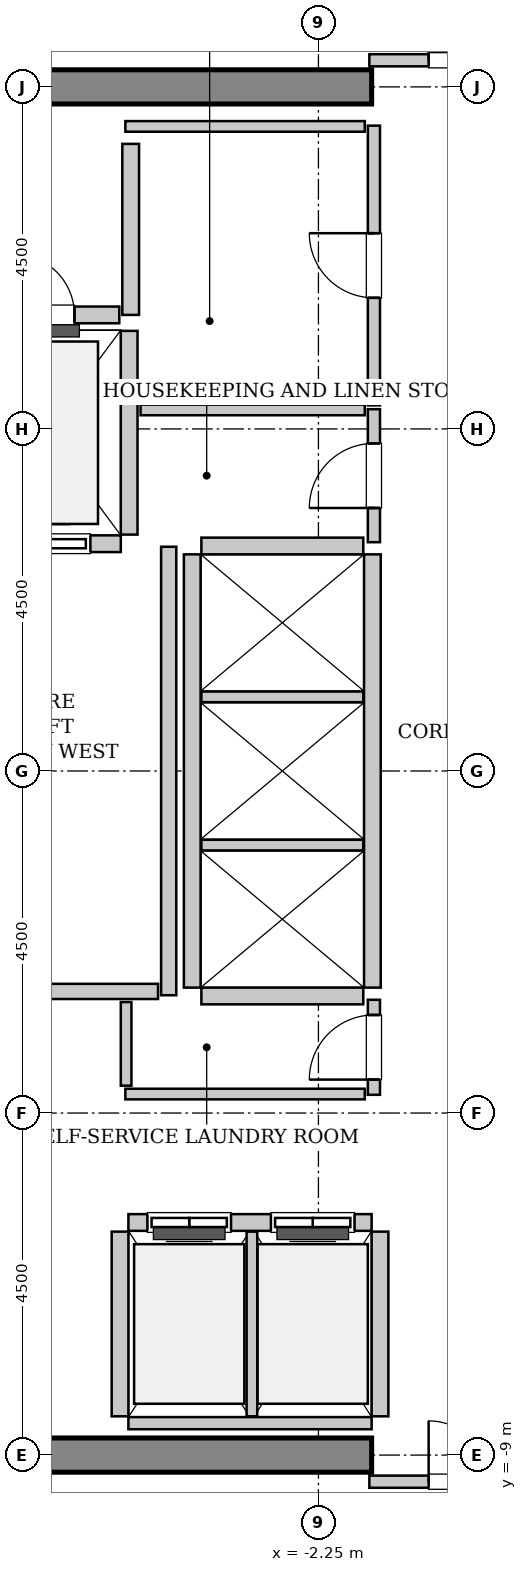
"""IFC4 building model, lengths in metres.
Left out: names, types, materials, properties, quantities, classifications, styles, units other than length and angle.
Written with IfcOpenShell. Run it as: python <this file> out.ifc"""

import sys

from ifc_helpers import new_model, si_unit, direction, frame, frame_2d, origin, place, context, subcontext, project, spatial, rectangle, extrude, source, transform, mapped, element, fill, save


model = new_model("IFC4")
c1 = context("Model", 3, precision=1e-05, world=origin(), true_north=direction((0.0, 1.0)))
c2 = subcontext(c1, "Body", "Model", "MODEL_VIEW")
j1 = project(units=[si_unit("LENGTHUNIT", "METRE"), si_unit("PLANEANGLEUNIT", "RADIAN")], contexts=[c1])
p1 = place(None, origin())
s1 = spatial("IfcSite", under=j1, at=p1, CompositionType="ELEMENT")
p2 = place(p1, origin())
s2 = spatial("IfcBuilding", under=s1, at=p2, CompositionType="ELEMENT")
p3 = place(p2, frame((0.0, 0.0, 206.6)))
s3 = spatial("IfcBuildingStorey", under=s2, at=p3, CompositionType="ELEMENT", Elevation=206.6)
m1 = source(origin(), c2, "Body", "SweptSolid", [
    extrude(rectangle(XDim=9.925, YDim=0.45, at=frame_2d((4.962, 0.0))), origin(), (0.0, 0.0, 1.0), 3.8),
])
for number, where, z_axis, x_axis in (
    (1, (-11.475, 9.0, 0.0), (0.0, 0.0, 1.0), (1.0, 0.0, 0.0)),
    (2, (-11.475, -9.0, 0.0), (0.0, 0.0, 1.0), (1.0, 0.0, 0.0)),
):
    element("IfcWall", number, at=place(p3, frame(where, z_axis=z_axis, x_axis=x_axis)), inside=s3, PredefinedType="SHEAR", context=c2, shape_type="MappedRepresentation", body=[
        mapped(m1, transform((0.0, 0.0, 0.0), x_axis=(1.0, 0.0, 0.0), y_axis=(0.0, 1.0, 0.0), z_axis=(0.0, 0.0, 1.0), scale=1.0)),
    ])
m2 = source(origin(), c2, "Body", "SweptSolid", [
    extrude(rectangle(XDim=2.0, YDim=0.22, at=frame_2d((1.0, 0.0))), origin(), (0.0, 0.0, 1.0), 3.535),
])
p4 = place(p3, frame((-6.85, 2.99, 0.0), z_axis=(0.0, 0.0, 1.0), x_axis=(1.0, 0.0, 0.0)))
e3 = element("IfcWall", 3, at=p4, inside=s3, PredefinedType="SOLIDWALL", context=c2, shape_type="MappedRepresentation", body=[
    mapped(m2, transform((0.0, 0.0, 0.0), x_axis=(1.0, 0.0, 0.0), y_axis=(0.0, 1.0, 0.0), z_axis=(0.0, 0.0, 1.0), scale=1.0)),
])
p5 = place(p4, frame((0.4, 0.0, 0.0)))
e4 = element("IfcOpeningElement", 4, at=p5, cuts=e3, PredefinedType="OPENING", context=c2, shape_type="SweptSolid", body=[
    extrude(rectangle(XDim=1.2, YDim=2.2, at=frame_2d((0.6, 1.1))), frame((0.0, 0.12, 0.0), z_axis=(0.0, -1.0, 0.0), x_axis=(1.0, 0.0, 0.0)), (0.0, 0.0, 1.0), 0.24),
])
m3 = source(origin(), c2, "Body", "SweptSolid", [
    extrude(rectangle(XDim=2.68, YDim=0.22, at=frame_2d((1.34, 0.0))), origin(), (0.0, 0.0, 1.0), 3.535),
])
p6 = place(p3, frame((-4.74, 3.11, 0.0), z_axis=(0.0, 0.0, 1.0), x_axis=(0.0, 1.0, 0.0)))
e5 = element("IfcWall", 5, at=p6, inside=s3, PredefinedType="SOLIDWALL", context=c2, shape_type="MappedRepresentation", body=[
    mapped(m3, transform((0.0, 0.0, 0.0), x_axis=(1.0, 0.0, 0.0), y_axis=(0.0, 1.0, 0.0), z_axis=(0.0, 0.0, 1.0), scale=1.0)),
])
m4 = source(origin(), c2, "Body", "SweptSolid", [
    extrude(rectangle(XDim=3.2, YDim=0.22, at=frame_2d((1.6, 0.0))), origin(), (0.0, 0.0, 1.0), 3.535),
])
p7 = place(p3, frame((-1.55, -5.94, 0.0), z_axis=(0.0, 0.0, 1.0), x_axis=(-1.0, 0.0, 0.0)))
e6 = element("IfcWall", 6, at=p7, inside=s3, PredefinedType="SOLIDWALL", context=c2, shape_type="MappedRepresentation", body=[
    mapped(m4, transform((0.0, 0.0, 0.0), x_axis=(1.0, 0.0, 0.0), y_axis=(0.0, 1.0, 0.0), z_axis=(0.0, 0.0, 1.0), scale=1.0)),
])
p8 = place(p7, frame((1.85, 0.0, 0.0)))
e7 = element("IfcOpeningElement", 7, at=p8, cuts=e6, PredefinedType="OPENING", context=c2, shape_type="SweptSolid", body=[
    extrude(rectangle(XDim=1.1, YDim=2.2, at=frame_2d((0.55, 1.1))), frame((0.0, 0.12, 0.0), z_axis=(0.0, -1.0, 0.0), x_axis=(1.0, 0.0, 0.0)), (0.0, 0.0, 1.0), 0.24),
])
p9 = place(p7, frame((0.225, 0.0, 0.0)))
e8 = element("IfcOpeningElement", 8, at=p9, cuts=e6, PredefinedType="OPENING", context=c2, shape_type="SweptSolid", body=[
    extrude(rectangle(XDim=1.1, YDim=2.2, at=frame_2d((0.55, 1.1))), frame((0.0, 0.12, 0.0), z_axis=(0.0, -1.0, 0.0), x_axis=(1.0, 0.0, 0.0)), (0.0, 0.0, 1.0), 0.24),
])
m5 = source(origin(), c2, "Body", "SweptSolid", [
    extrude(rectangle(XDim=3.2, YDim=0.16, at=frame_2d((1.6, 0.0))), origin(), (0.0, 0.0, 1.0), 2.625),
])
p10 = place(p3, frame((-4.75, -8.58, 0.0), z_axis=(0.0, 0.0, 1.0), x_axis=(1.0, 0.0, 0.0)))
e9 = element("IfcWall", 9, at=p10, inside=s3, PredefinedType="PARTITIONING", context=c2, shape_type="MappedRepresentation", body=[
    mapped(m5, transform((0.0, 0.0, 0.0), x_axis=(1.0, 0.0, 0.0), y_axis=(0.0, 1.0, 0.0), z_axis=(0.0, 0.0, 1.0), scale=1.0)),
])
m6 = source(origin(), c2, "Body", "SweptSolid", [
    extrude(rectangle(XDim=2.43, YDim=0.22, at=frame_2d((1.215, 0.0))), origin(), (0.0, 0.0, 1.0), 3.535),
])
p11 = place(p3, frame((-4.86, -6.06, 0.0), z_axis=(0.0, 0.0, 1.0), x_axis=(0.0, -1.0, 0.0)))
e10 = element("IfcWall", 10, at=p11, inside=s3, PredefinedType="SOLIDWALL", context=c2, shape_type="MappedRepresentation", body=[
    mapped(m6, transform((0.0, 0.0, 0.0), x_axis=(1.0, 0.0, 0.0), y_axis=(0.0, 1.0, 0.0), z_axis=(0.0, 0.0, 1.0), scale=1.0)),
])
m7 = source(origin(), c2, "Body", "SweptSolid", [
    extrude(rectangle(XDim=2.43, YDim=0.14, at=frame_2d((1.215, 0.0))), origin(), (0.0, 0.0, 1.0), 3.535),
])
p12 = place(p3, frame((-3.125, -8.49, 0.0), z_axis=(0.0, 0.0, 1.0), x_axis=(0.0, 1.0, 0.0)))
e11 = element("IfcWall", 11, at=p12, inside=s3, PredefinedType="PARTITIONING", context=c2, shape_type="MappedRepresentation", body=[
    mapped(m7, transform((0.0, 0.0, 0.0), x_axis=(1.0, 0.0, 0.0), y_axis=(0.0, 1.0, 0.0), z_axis=(0.0, 0.0, 1.0), scale=1.0)),
])
p13 = place(p3, frame((-1.44, -8.49, 0.0), z_axis=(0.0, 0.0, 1.0), x_axis=(0.0, 1.0, 0.0)))
e12 = element("IfcWall", 12, at=p13, inside=s3, PredefinedType="SOLIDWALL", context=c2, shape_type="MappedRepresentation", body=[
    mapped(m6, transform((0.0, 0.0, 0.0), x_axis=(1.0, 0.0, 0.0), y_axis=(0.0, 1.0, 0.0), z_axis=(0.0, 0.0, 1.0), scale=1.0)),
])
m8 = source(origin(), c2, "Body", "SweptSolid", [
    extrude(rectangle(XDim=5.7, YDim=0.22, at=frame_2d((2.85, 0.0))), origin(), (0.0, 0.0, 1.0), 3.535),
])
for number, where, z_axis, x_axis in (
    (13, (-1.54, -2.85, 0.0), (0.0, 0.0, 1.0), (0.0, 1.0, 0.0)),
    (14, (-3.91, 2.85, 0.0), (0.0, 0.0, 1.0), (0.0, -1.0, 0.0)),
):
    element("IfcWall", number, at=place(p3, frame(where, z_axis=z_axis, x_axis=x_axis)), inside=s3, PredefinedType="SOLIDWALL", context=c2, shape_type="MappedRepresentation", body=[
        mapped(m8, transform((0.0, 0.0, 0.0), x_axis=(1.0, 0.0, 0.0), y_axis=(0.0, 1.0, 0.0), z_axis=(0.0, 0.0, 1.0), scale=1.0)),
    ])
m9 = source(origin(), c2, "Body", "SweptSolid", [
    extrude(rectangle(XDim=2.13, YDim=0.22, at=frame_2d((1.065, 0.0))), origin(), (0.0, 0.0, 1.0), 3.535),
])
p14 = place(p3, frame((-3.79, -2.96, 0.0), z_axis=(0.0, 0.0, 1.0), x_axis=(1.0, 0.0, 0.0)))
e15 = element("IfcWall", 15, at=p14, inside=s3, PredefinedType="SOLIDWALL", context=c2, shape_type="MappedRepresentation", body=[
    mapped(m9, transform((0.0, 0.0, 0.0), x_axis=(1.0, 0.0, 0.0), y_axis=(0.0, 1.0, 0.0), z_axis=(0.0, 0.0, 1.0), scale=1.0)),
])
m10 = source(origin(), c2, "Body", "SweptSolid", [
    extrude(rectangle(XDim=2.13, YDim=0.14, at=frame_2d((1.065, 0.0))), origin(), (0.0, 0.0, 1.0), 3.535),
])
for number, where, z_axis, x_axis in (
    (16, (-3.79, -0.975, 0.0), (0.0, 0.0, 1.0), (1.0, 0.0, 0.0)),
    (17, (-3.79, 0.975, 0.0), (0.0, 0.0, 1.0), (1.0, 0.0, 0.0)),
):
    element("IfcWall", number, at=place(p3, frame(where, z_axis=z_axis, x_axis=x_axis)), inside=s3, PredefinedType="PARTITIONING", context=c2, shape_type="MappedRepresentation", body=[
        mapped(m10, transform((0.0, 0.0, 0.0), x_axis=(1.0, 0.0, 0.0), y_axis=(0.0, 1.0, 0.0), z_axis=(0.0, 0.0, 1.0), scale=1.0)),
    ])
p15 = place(p3, frame((-1.66, 2.96, 0.0), z_axis=(0.0, 0.0, 1.0), x_axis=(-1.0, 0.0, 0.0)))
e18 = element("IfcWall", 18, at=p15, inside=s3, PredefinedType="SOLIDWALL", context=c2, shape_type="MappedRepresentation", body=[
    mapped(m9, transform((0.0, 0.0, 0.0), x_axis=(1.0, 0.0, 0.0), y_axis=(0.0, 1.0, 0.0), z_axis=(0.0, 0.0, 1.0), scale=1.0)),
])
m11 = source(origin(), c2, "Body", "SweptSolid", [
    extrude(rectangle(XDim=2.25, YDim=0.22, at=frame_2d((1.125, 0.0))), origin(), (0.0, 0.0, 1.0), 3.535),
])
p16 = place(p3, frame((-4.72, 6.0, 0.0), z_axis=(0.0, 0.0, 1.0), x_axis=(0.0, 1.0, 0.0)))
e19 = element("IfcWall", 19, at=p16, inside=s3, PredefinedType="SOLIDWALL", context=c2, shape_type="MappedRepresentation", body=[
    mapped(m11, transform((0.0, 0.0, 0.0), x_axis=(1.0, 0.0, 0.0), y_axis=(0.0, 1.0, 0.0), z_axis=(0.0, 0.0, 1.0), scale=1.0)),
])
m12 = source(origin(), c2, "Body", "SweptSolid", [
    extrude(rectangle(XDim=1.98, YDim=0.22, at=frame_2d((0.99, 0.0))), origin(), (0.0, 0.0, 1.0), 3.535),
])
p17 = place(p3, frame((-6.85, 6.0, 0.0), z_axis=(0.0, 0.0, 1.0), x_axis=(1.0, 0.0, 0.0)))
e20 = element("IfcWall", 20, at=p17, inside=s3, PredefinedType="SOLIDWALL", context=c2, shape_type="MappedRepresentation", body=[
    mapped(m12, transform((0.0, 0.0, 0.0), x_axis=(1.0, 0.0, 0.0), y_axis=(0.0, 1.0, 0.0), z_axis=(0.0, 0.0, 1.0), scale=1.0)),
])
p18 = place(p17, frame((0.59, 0.0, 0.0)))
e21 = element("IfcOpeningElement", 21, at=p18, cuts=e20, PredefinedType="OPENING", context=c2, shape_type="SweptSolid", body=[
    extrude(rectangle(XDim=0.8, YDim=2.0, at=frame_2d((0.4, 1.0))), frame((0.0, 0.12, 0.0), z_axis=(0.0, -1.0, 0.0), x_axis=(1.0, 0.0, 0.0)), (0.0, 0.0, 1.0), 0.24),
])
m13 = source(origin(), c2, "Body", "SweptSolid", [
    extrude(rectangle(XDim=5.9, YDim=0.2, at=frame_2d((2.95, 0.0))), origin(), (0.0, 0.0, 1.0), 3.535),
])
p19 = place(p3, frame((-4.22, -2.95, 0.0), z_axis=(0.0, 0.0, 1.0), x_axis=(0.0, 1.0, 0.0)))
e22 = element("IfcWall", 22, at=p19, inside=s3, PredefinedType="PARTITIONING", context=c2, shape_type="MappedRepresentation", body=[
    mapped(m13, transform((0.0, 0.0, 0.0), x_axis=(1.0, 0.0, 0.0), y_axis=(0.0, 1.0, 0.0), z_axis=(0.0, 0.0, 1.0), scale=1.0)),
])
m14 = source(origin(), c2, "Body", "SweptSolid", [
    extrude(rectangle(XDim=2.9, YDim=0.2, at=frame_2d((1.45, 0.0))), origin(), (0.0, 0.0, 1.0), 3.535),
])
p20 = place(p3, frame((-7.26, -2.9, 0.0), z_axis=(0.0, 0.0, 1.0), x_axis=(1.0, 0.0, 0.0)))
e23 = element("IfcWall", 23, at=p20, inside=s3, PredefinedType="PARTITIONING", context=c2, shape_type="MappedRepresentation", body=[
    mapped(m14, transform((0.0, 0.0, 0.0), x_axis=(1.0, 0.0, 0.0), y_axis=(0.0, 1.0, 0.0), z_axis=(0.0, 0.0, 1.0), scale=1.0)),
])
m15 = source(origin(), c2, "Body", "SweptSolid", [
    extrude(rectangle(XDim=3.16, YDim=0.16, at=frame_2d((1.58, 0.0))), origin(), (0.0, 0.0, 1.0), 2.625),
])
p21 = place(p3, frame((-1.58, 9.35, 0.0), z_axis=(0.0, 0.0, 1.0), x_axis=(1.0, 0.0, 0.0)))
e24 = element("IfcWall", 24, at=p21, inside=s3, PredefinedType="PARTITIONING", context=c2, shape_type="MappedRepresentation", body=[
    mapped(m15, transform((0.0, 0.0, 0.0), x_axis=(1.0, 0.0, 0.0), y_axis=(0.0, 1.0, 0.0), z_axis=(0.0, 0.0, 1.0), scale=1.0)),
])
p22 = place(p21, frame((0.78, 0.0, 0.0)))
e25 = element("IfcOpeningElement", 25, at=p22, cuts=e24, PredefinedType="OPENING", context=c2, shape_type="SweptSolid", body=[
    extrude(rectangle(XDim=1.6, YDim=2.3, at=frame_2d((0.8, 1.15))), frame((0.0, 0.09, 0.0), z_axis=(0.0, -1.0, 0.0), x_axis=(1.0, 0.0, 0.0)), (0.0, 0.0, 1.0), 0.18),
])
p23 = place(p3, frame((-1.58, -9.35, 0.0), z_axis=(0.0, 0.0, 1.0), x_axis=(1.0, 0.0, 0.0)))
e26 = element("IfcWall", 26, at=p23, inside=s3, PredefinedType="PARTITIONING", context=c2, shape_type="MappedRepresentation", body=[
    mapped(m15, transform((0.0, 0.0, 0.0), x_axis=(1.0, 0.0, 0.0), y_axis=(0.0, 1.0, 0.0), z_axis=(0.0, 0.0, 1.0), scale=1.0)),
])
p24 = place(p23, frame((0.78, 0.0, 0.0)))
e27 = element("IfcOpeningElement", 27, at=p24, cuts=e26, PredefinedType="OPENING", context=c2, shape_type="SweptSolid", body=[
    extrude(rectangle(XDim=1.6, YDim=2.3, at=frame_2d((0.8, 1.15))), frame((0.0, 0.09, 0.0), z_axis=(0.0, -1.0, 0.0), x_axis=(1.0, 0.0, 0.0)), (0.0, 0.0, 1.0), 0.18),
])
m16 = source(origin(), c2, "Body", "SweptSolid", [
    extrude(rectangle(XDim=1.75, YDim=0.16, at=frame_2d((0.875, 0.0))), origin(), (0.0, 0.0, 1.0), 3.535),
])
p25 = place(p3, frame((-1.52, 3.01, 0.0), z_axis=(0.0, 0.0, 1.0), x_axis=(0.0, 1.0, 0.0)))
e28 = element("IfcWall", 28, at=p25, inside=s3, PredefinedType="PARTITIONING", context=c2, shape_type="MappedRepresentation", body=[
    mapped(m16, transform((0.0, 0.0, 0.0), x_axis=(1.0, 0.0, 0.0), y_axis=(0.0, 1.0, 0.0), z_axis=(0.0, 0.0, 1.0), scale=1.0)),
])
p26 = place(p25, frame((0.45, 0.0, 0.0)))
e29 = element("IfcOpeningElement", 29, at=p26, cuts=e28, PredefinedType="OPENING", context=c2, shape_type="SweptSolid", body=[
    extrude(rectangle(XDim=0.85, YDim=2.1, at=frame_2d((0.425, 1.05))), frame((0.0, 0.09, 0.0), z_axis=(0.0, -1.0, 0.0), x_axis=(1.0, 0.0, 0.0)), (0.0, 0.0, 1.0), 0.18),
])
m17 = source(origin(), c2, "Body", "SweptSolid", [
    extrude(rectangle(XDim=2.95, YDim=0.14, at=frame_2d((1.475, 0.0))), origin(), (0.0, 0.0, 1.0), 3.535),
])
p27 = place(p3, frame((-4.59, 4.75, 0.0), z_axis=(0.0, 0.0, 1.0), x_axis=(1.0, 0.0, 0.0)))
e30 = element("IfcWall", 30, at=p27, inside=s3, PredefinedType="PARTITIONING", context=c2, shape_type="MappedRepresentation", body=[
    mapped(m17, transform((0.0, 0.0, 0.0), x_axis=(1.0, 0.0, 0.0), y_axis=(0.0, 1.0, 0.0), z_axis=(0.0, 0.0, 1.0), scale=1.0)),
])
m18 = source(origin(), c2, "Body", "SweptSolid", [
    extrude(rectangle(XDim=3.68, YDim=0.16, at=frame_2d((1.84, 0.0))), origin(), (0.0, 0.0, 1.0), 3.535),
])
p28 = place(p3, frame((-1.52, 4.81, 0.0), z_axis=(0.0, 0.0, 1.0), x_axis=(0.0, 1.0, 0.0)))
e31 = element("IfcWall", 31, at=p28, inside=s3, PredefinedType="PARTITIONING", context=c2, shape_type="MappedRepresentation", body=[
    mapped(m18, transform((0.0, 0.0, 0.0), x_axis=(1.0, 0.0, 0.0), y_axis=(0.0, 1.0, 0.0), z_axis=(0.0, 0.0, 1.0), scale=1.0)),
])
p29 = place(p28, frame((1.415, 0.0, 0.0)))
e32 = element("IfcOpeningElement", 32, at=p29, cuts=e31, PredefinedType="OPENING", context=c2, shape_type="SweptSolid", body=[
    extrude(rectangle(XDim=0.85, YDim=2.1, at=frame_2d((0.425, 1.05))), frame((0.0, 0.09, 0.0), z_axis=(0.0, -1.0, 0.0), x_axis=(1.0, 0.0, 0.0)), (0.0, 0.0, 1.0), 0.18),
])
m19 = source(origin(), c2, "Body", "SweptSolid", [
    extrude(rectangle(XDim=3.15, YDim=0.14, at=frame_2d((1.575, 0.0))), origin(), (0.0, 0.0, 1.0), 3.535),
])
p30 = place(p3, frame((-4.79, 8.48, 0.0), z_axis=(0.0, 0.0, 1.0), x_axis=(1.0, 0.0, 0.0)))
e33 = element("IfcWall", 33, at=p30, inside=s3, PredefinedType="PARTITIONING", context=c2, shape_type="MappedRepresentation", body=[
    mapped(m19, transform((0.0, 0.0, 0.0), x_axis=(1.0, 0.0, 0.0), y_axis=(0.0, 1.0, 0.0), z_axis=(0.0, 0.0, 1.0), scale=1.0)),
])
m20 = source(origin(), c2, "Body", "SweptSolid", [
    extrude(rectangle(XDim=1.25, YDim=0.16, at=frame_2d((0.625, 0.0))), origin(), (0.0, 0.0, 1.0), 3.535),
])
p31 = place(p3, frame((-1.52, -4.26, 0.0), z_axis=(0.0, 0.0, 1.0), x_axis=(0.0, 1.0, 0.0)))
e34 = element("IfcWall", 34, at=p31, inside=s3, PredefinedType="PARTITIONING", context=c2, shape_type="MappedRepresentation", body=[
    mapped(m20, transform((0.0, 0.0, 0.0), x_axis=(1.0, 0.0, 0.0), y_axis=(0.0, 1.0, 0.0), z_axis=(0.0, 0.0, 1.0), scale=1.0)),
])
p32 = place(p31, frame((0.2, 0.0, 0.0)))
e35 = element("IfcOpeningElement", 35, at=p32, cuts=e34, PredefinedType="OPENING", context=c2, shape_type="SweptSolid", body=[
    extrude(rectangle(XDim=0.85, YDim=2.1, at=frame_2d((0.425, 1.05))), frame((0.0, 0.09, 0.0), z_axis=(0.0, -1.0, 0.0), x_axis=(1.0, 0.0, 0.0)), (0.0, 0.0, 1.0), 0.18),
])
p33 = place(p3, frame((-4.79, -4.25, 0.0), z_axis=(0.0, 0.0, 1.0), x_axis=(1.0, 0.0, 0.0)))
e36 = element("IfcWall", 36, at=p33, inside=s3, PredefinedType="PARTITIONING", context=c2, shape_type="MappedRepresentation", body=[
    mapped(m19, transform((0.0, 0.0, 0.0), x_axis=(1.0, 0.0, 0.0), y_axis=(0.0, 1.0, 0.0), z_axis=(0.0, 0.0, 1.0), scale=1.0)),
])
m21 = source(origin(), c2, "Body", "SweptSolid", [
    extrude(rectangle(XDim=1.1, YDim=0.14, at=frame_2d((0.55, 0.0))), origin(), (0.0, 0.0, 1.0), 3.535),
])
p34 = place(p3, frame((-4.78, -4.14, 0.0), z_axis=(0.0, 0.0, 1.0), x_axis=(0.0, 1.0, 0.0)))
e37 = element("IfcWall", 37, at=p34, inside=s3, PredefinedType="PARTITIONING", context=c2, shape_type="MappedRepresentation", body=[
    mapped(m21, transform((0.0, 0.0, 0.0), x_axis=(1.0, 0.0, 0.0), y_axis=(0.0, 1.0, 0.0), z_axis=(0.0, 0.0, 1.0), scale=1.0)),
])
m22 = source(origin(), c2, "Body", "SweptSolid", [
    extrude(rectangle(XDim=1.2, YDim=2.2, at=frame_2d((0.6, 1.1))), frame((0.0, 0.025, 0.0), z_axis=(0.0, -1.0, 0.0), x_axis=(1.0, 0.0, 0.0)), (0.0, 0.0, 1.0), 0.05),
])
p35 = place(p5, origin())
e38 = element("IfcDoor", 38, at=p35, inside=s3, OperationType="SLIDING_TO_LEFT", PredefinedType="DOOR", context=c2, shape_type="MappedRepresentation", body=[
    mapped(m22, transform((0.0, 0.0, 0.0), x_axis=(1.0, 0.0, 0.0), y_axis=(0.0, 1.0, 0.0), z_axis=(0.0, 0.0, 1.0), scale=1.0)),
])
fill(e4, e38)
m23 = source(origin(), c2, "Body", "SweptSolid", [
    extrude(rectangle(XDim=1.1, YDim=2.2, at=frame_2d((0.55, 1.1))), frame((0.0, 0.025, 0.0), z_axis=(0.0, -1.0, 0.0), x_axis=(1.0, 0.0, 0.0)), (0.0, 0.0, 1.0), 0.05),
])
p36 = place(p8, origin())
e39 = element("IfcDoor", 39, at=p36, inside=s3, OperationType="DOUBLE_DOOR_SLIDING", PredefinedType="DOOR", context=c2, shape_type="MappedRepresentation", body=[
    mapped(m23, transform((0.0, 0.0, 0.0), x_axis=(1.0, 0.0, 0.0), y_axis=(0.0, 1.0, 0.0), z_axis=(0.0, 0.0, 1.0), scale=1.0)),
])
fill(e7, e39)
p37 = place(p9, origin())
e40 = element("IfcDoor", 40, at=p37, inside=s3, OperationType="DOUBLE_DOOR_SLIDING", PredefinedType="DOOR", context=c2, shape_type="MappedRepresentation", body=[
    mapped(m23, transform((0.0, 0.0, 0.0), x_axis=(1.0, 0.0, 0.0), y_axis=(0.0, 1.0, 0.0), z_axis=(0.0, 0.0, 1.0), scale=1.0)),
])
fill(e8, e40)
m24 = source(origin(), c2, "Body", "SweptSolid", [
    extrude(rectangle(XDim=0.8, YDim=2.0, at=frame_2d((0.4, 1.0))), frame((0.0, 0.025, 0.0), z_axis=(0.0, -1.0, 0.0), x_axis=(1.0, 0.0, 0.0)), (0.0, 0.0, 1.0), 0.05),
])
p38 = place(p18, origin())
e41 = element("IfcDoor", 41, at=p38, inside=s3, OperationType="SINGLE_SWING_LEFT", PredefinedType="TRAPDOOR", context=c2, shape_type="MappedRepresentation", body=[
    mapped(m24, transform((0.0, 0.0, 0.0), x_axis=(1.0, 0.0, 0.0), y_axis=(0.0, 1.0, 0.0), z_axis=(0.0, 0.0, 1.0), scale=1.0)),
])
fill(e21, e41)
m25 = source(origin(), c2, "Body", "SweptSolid", [
    extrude(rectangle(XDim=1.6, YDim=2.3, at=frame_2d((0.8, 1.15))), frame((0.0, 0.025, 0.0), z_axis=(0.0, -1.0, 0.0), x_axis=(1.0, 0.0, 0.0)), (0.0, 0.0, 1.0), 0.05),
])
p39 = place(p22, origin())
e42 = element("IfcDoor", 42, at=p39, inside=s3, OperationType="DOUBLE_DOOR_SINGLE_SWING", PredefinedType="DOOR", context=c2, shape_type="MappedRepresentation", body=[
    mapped(m25, transform((0.0, 0.0, 0.0), x_axis=(1.0, 0.0, 0.0), y_axis=(0.0, 1.0, 0.0), z_axis=(0.0, 0.0, 1.0), scale=1.0)),
])
fill(e25, e42)
p40 = place(p24, origin())
e43 = element("IfcDoor", 43, at=p40, inside=s3, OperationType="DOUBLE_DOOR_SINGLE_SWING", PredefinedType="DOOR", context=c2, shape_type="MappedRepresentation", body=[
    mapped(m25, transform((0.0, 0.0, 0.0), x_axis=(1.0, 0.0, 0.0), y_axis=(0.0, 1.0, 0.0), z_axis=(0.0, 0.0, 1.0), scale=1.0)),
])
fill(e27, e43)
m26 = source(origin(), c2, "Body", "SweptSolid", [
    extrude(rectangle(XDim=0.85, YDim=2.1, at=frame_2d((0.425, 1.05))), frame((0.0, 0.025, 0.0), z_axis=(0.0, -1.0, 0.0), x_axis=(1.0, 0.0, 0.0)), (0.0, 0.0, 1.0), 0.05),
])
p41 = place(p26, origin())
e44 = element("IfcDoor", 44, at=p41, inside=s3, OperationType="SINGLE_SWING_LEFT", PredefinedType="DOOR", context=c2, shape_type="MappedRepresentation", body=[
    mapped(m26, transform((0.0, 0.0, 0.0), x_axis=(1.0, 0.0, 0.0), y_axis=(0.0, 1.0, 0.0), z_axis=(0.0, 0.0, 1.0), scale=1.0)),
])
fill(e29, e44)
p42 = place(p29, origin())
e45 = element("IfcDoor", 45, at=p42, inside=s3, OperationType="SINGLE_SWING_RIGHT", PredefinedType="DOOR", context=c2, shape_type="MappedRepresentation", body=[
    mapped(m26, transform((0.0, 0.0, 0.0), x_axis=(1.0, 0.0, 0.0), y_axis=(0.0, 1.0, 0.0), z_axis=(0.0, 0.0, 1.0), scale=1.0)),
])
fill(e32, e45)
p43 = place(p32, origin())
e46 = element("IfcDoor", 46, at=p43, inside=s3, OperationType="SINGLE_SWING_LEFT", PredefinedType="DOOR", context=c2, shape_type="MappedRepresentation", body=[
    mapped(m26, transform((0.0, 0.0, 0.0), x_axis=(1.0, 0.0, 0.0), y_axis=(0.0, 1.0, 0.0), z_axis=(0.0, 0.0, 1.0), scale=1.0)),
])
fill(e35, e46)
save(model, sys.argv[1])
